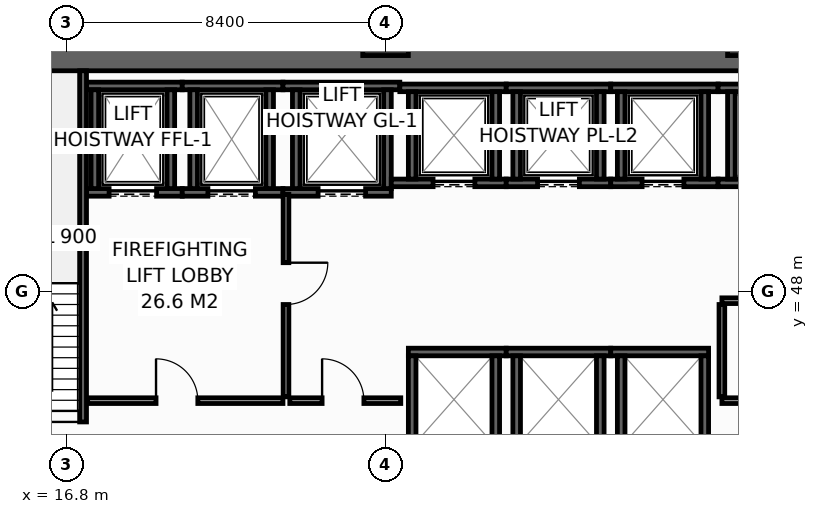
"""IFC4 building model, lengths in metres.
Left out: names, types, materials, properties, quantities, classifications, styles, units other than length and angle.
Written with IfcOpenShell. Run it as: python <this file> out.ifc"""

import sys

from ifc_helpers import new_model, si_unit, direction, frame, frame_2d, origin, origin_2d, place, context, subcontext, project, spatial, rectangle, hollow_rectangle, extrude, element, fill, save


model = new_model("IFC4")
c1 = context("Model", 3, precision=1e-05, world=origin(), true_north=direction((0.0, 1.0)))
c2 = subcontext(c1, "Body", "Model", "MODEL_VIEW")
j1 = project(units=[si_unit("LENGTHUNIT", "METRE"), si_unit("PLANEANGLEUNIT", "RADIAN")], contexts=[c1])
p1 = place(None, origin())
s1 = spatial("IfcSite", under=j1, at=p1, CompositionType="ELEMENT")
p2 = place(p1, origin())
s2 = spatial("IfcBuilding", under=s1, at=p2, CompositionType="ELEMENT")
p3 = place(p2, frame((0.0, 0.0, 47.2)))
s3 = spatial("IfcBuildingStorey", under=s2, at=p3, CompositionType="ELEMENT", Elevation=47.2)
p4 = place(p3, frame((13.5, 54.1, 0.0), z_axis=(0.0, 0.0, 1.0), x_axis=(1.0, 0.0, 0.0)))
e1 = element("IfcWall", 1, at=p4, inside=s3, PredefinedType="SHEAR", context=c2, shape_type="SweptSolid", body=[
    extrude(rectangle(XDim=32.9, YDim=0.6, at=frame_2d((16.45, 0.0))), origin(), (0.0, 0.0, 1.0), 4.15),
])
for number, where, z_axis, x_axis in (
    (2, (25.2, 54.8, 0.0), (0.0, 0.0, 1.0), (1.0, 0.0, 0.0)),
    (3, (34.8, 54.8, 0.0), (0.0, 0.0, 1.0), (1.0, 0.0, 0.0)),
):
    element("IfcColumn", number, at=place(p3, frame(where, z_axis=z_axis, x_axis=x_axis)), inside=s3, PredefinedType="COLUMN", context=c2, shape_type="SweptSolid", body=[
        extrude(hollow_rectangle(XDim=1.2, YDim=1.2, WallThickness=0.055, at=origin_2d()), origin(), (0.0, 0.0, 1.0), 4.4),
    ])
p5 = place(p3, frame((17.33, 50.6, 0.0), z_axis=(0.0, 0.0, 1.0), x_axis=(1.0, 0.0, 0.0)))
e4 = element("IfcWall", 4, at=p5, inside=s3, PredefinedType="SHEAR", context=c2, shape_type="SweptSolid", body=[
    extrude(rectangle(XDim=2.52, YDim=0.2, at=frame_2d((1.26, 0.0))), origin(), (0.0, 0.0, 1.0), 4.15),
])
p6 = place(p5, frame((0.595, 0.0, 0.0)))
e5 = element("IfcOpeningElement", 5, at=p6, cuts=e4, PredefinedType="OPENING", context=c2, shape_type="SweptSolid", body=[
    extrude(rectangle(XDim=1.25, YDim=2.3, at=frame_2d((0.625, 1.15))), frame((0.0, 0.11, 0.0), z_axis=(0.0, -1.0, 0.0), x_axis=(1.0, 0.0, 0.0)), (0.0, 0.0, 1.0), 0.22),
])
p7 = place(p3, frame((17.33, 53.4, 0.0), z_axis=(0.0, 0.0, 1.0), x_axis=(1.0, 0.0, 0.0)))
e6 = element("IfcWall", 6, at=p7, inside=s3, PredefinedType="SHEAR", context=c2, shape_type="SweptSolid", body=[
    extrude(rectangle(XDim=2.52, YDim=0.2, at=frame_2d((1.26, 0.0))), origin(), (0.0, 0.0, 1.0), 4.15),
])
for number, where, z_axis, x_axis in (
    (7, (17.55, 50.7, 0.0), (0.0, 0.0, 1.0), (0.0, 1.0, 0.0)),
    (8, (19.55, 50.7, 0.0), (0.0, 0.0, 1.0), (0.0, 1.0, 0.0)),
):
    element("IfcWall", number, at=place(p3, frame(where, z_axis=z_axis, x_axis=x_axis)), inside=s3, PredefinedType="SHEAR", context=c2, shape_type="SweptSolid", body=[
        extrude(rectangle(XDim=2.6, YDim=0.2, at=frame_2d((1.3, 0.0))), origin(), (0.0, 0.0, 1.0), 4.15),
    ])
p8 = place(p3, frame((19.85, 50.6, 0.0), z_axis=(0.0, 0.0, 1.0), x_axis=(1.0, 0.0, 0.0)))
e9 = element("IfcWall", 9, at=p8, inside=s3, PredefinedType="SHEAR", context=c2, shape_type="SweptSolid", body=[
    extrude(rectangle(XDim=2.65, YDim=0.2, at=frame_2d((1.325, 0.0))), origin(), (0.0, 0.0, 1.0), 4.15),
])
p9 = place(p8, frame((0.675, 0.0, 0.0)))
e10 = element("IfcOpeningElement", 10, at=p9, cuts=e9, PredefinedType="OPENING", context=c2, shape_type="SweptSolid", body=[
    extrude(rectangle(XDim=1.25, YDim=2.3, at=frame_2d((0.625, 1.15))), frame((0.0, 0.11, 0.0), z_axis=(0.0, -1.0, 0.0), x_axis=(1.0, 0.0, 0.0)), (0.0, 0.0, 1.0), 0.22),
])
p10 = place(p3, frame((19.85, 53.4, 0.0), z_axis=(0.0, 0.0, 1.0), x_axis=(1.0, 0.0, 0.0)))
e11 = element("IfcWall", 11, at=p10, inside=s3, PredefinedType="SHEAR", context=c2, shape_type="SweptSolid", body=[
    extrude(rectangle(XDim=2.65, YDim=0.2, at=frame_2d((1.325, 0.0))), origin(), (0.0, 0.0, 1.0), 4.15),
])
for number, where, z_axis, x_axis in (
    (12, (20.15, 50.7, 0.0), (0.0, 0.0, 1.0), (0.0, 1.0, 0.0)),
    (13, (22.15, 50.7, 0.0), (0.0, 0.0, 1.0), (0.0, 1.0, 0.0)),
):
    element("IfcWall", number, at=place(p3, frame(where, z_axis=z_axis, x_axis=x_axis)), inside=s3, PredefinedType="SHEAR", context=c2, shape_type="SweptSolid", body=[
        extrude(rectangle(XDim=2.6, YDim=0.2, at=frame_2d((1.3, 0.0))), origin(), (0.0, 0.0, 1.0), 4.15),
    ])
p11 = place(p3, frame((22.5, 50.6, 0.0), z_axis=(0.0, 0.0, 1.0), x_axis=(1.0, 0.0, 0.0)))
e14 = element("IfcWall", 14, at=p11, inside=s3, PredefinedType="SHEAR", context=c2, shape_type="SweptSolid", body=[
    extrude(rectangle(XDim=2.85, YDim=0.2, at=frame_2d((1.425, 0.0))), origin(), (0.0, 0.0, 1.0), 4.15),
])
p12 = place(p11, frame((0.925, 0.0, 0.0)))
e15 = element("IfcOpeningElement", 15, at=p12, cuts=e14, PredefinedType="OPENING", context=c2, shape_type="SweptSolid", body=[
    extrude(rectangle(XDim=1.25, YDim=2.3, at=frame_2d((0.625, 1.15))), frame((0.0, 0.11, 0.0), z_axis=(0.0, -1.0, 0.0), x_axis=(1.0, 0.0, 0.0)), (0.0, 0.0, 1.0), 0.22),
])
p13 = place(p3, frame((22.5, 53.4, 0.0), z_axis=(0.0, 0.0, 1.0), x_axis=(1.0, 0.0, 0.0)))
e16 = element("IfcWall", 16, at=p13, inside=s3, PredefinedType="SHEAR", context=c2, shape_type="SweptSolid", body=[
    extrude(rectangle(XDim=3.075, YDim=0.2, at=frame_2d((1.538, 0.0))), origin(), (0.0, 0.0, 1.0), 4.15),
])
for number, where, z_axis, x_axis in (
    (17, (22.85, 50.7, 0.0), (0.0, 0.0, 1.0), (0.0, 1.0, 0.0)),
    (18, (25.25, 50.7, 0.0), (0.0, 0.0, 1.0), (0.0, 1.0, 0.0)),
):
    element("IfcWall", number, at=place(p3, frame(where, z_axis=z_axis, x_axis=x_axis)), inside=s3, PredefinedType="SHEAR", context=c2, shape_type="SweptSolid", body=[
        extrude(rectangle(XDim=2.6, YDim=0.2, at=frame_2d((1.3, 0.0))), origin(), (0.0, 0.0, 1.0), 4.15),
    ])
p14 = place(p3, frame((25.35, 50.85, 0.0), z_axis=(0.0, 0.0, 1.0), x_axis=(1.0, 0.0, 0.0)))
e19 = element("IfcWall", 19, at=p14, inside=s3, PredefinedType="SHEAR", context=c2, shape_type="SweptSolid", body=[
    extrude(rectangle(XDim=3.025, YDim=0.2, at=frame_2d((1.512, 0.0))), origin(), (0.0, 0.0, 1.0), 4.15),
])
p15 = place(p14, frame((1.1, 0.0, 0.0)))
e20 = element("IfcOpeningElement", 20, at=p15, cuts=e19, PredefinedType="OPENING", context=c2, shape_type="SweptSolid", body=[
    extrude(rectangle(XDim=1.1, YDim=2.2, at=frame_2d((0.55, 1.1))), frame((0.0, 0.11, 0.0), z_axis=(0.0, -1.0, 0.0), x_axis=(1.0, 0.0, 0.0)), (0.0, 0.0, 1.0), 0.22),
])
p16 = place(p3, frame((25.575, 53.35, 0.0), z_axis=(0.0, 0.0, 1.0), x_axis=(1.0, 0.0, 0.0)))
e21 = element("IfcWall", 21, at=p16, inside=s3, PredefinedType="SHEAR", context=c2, shape_type="SweptSolid", body=[
    extrude(rectangle(XDim=2.8, YDim=0.2, at=frame_2d((1.4, 0.0))), origin(), (0.0, 0.0, 1.0), 4.15),
])
for number, where, z_axis, x_axis in (
    (22, (25.9, 50.95, 0.0), (0.0, 0.0, 1.0), (0.0, 1.0, 0.0)),
    (23, (28.1, 50.95, 0.0), (0.0, 0.0, 1.0), (0.0, 1.0, 0.0)),
):
    element("IfcWall", number, at=place(p3, frame(where, z_axis=z_axis, x_axis=x_axis)), inside=s3, PredefinedType="SHEAR", context=c2, shape_type="SweptSolid", body=[
        extrude(rectangle(XDim=2.3, YDim=0.2, at=frame_2d((1.15, 0.0))), origin(), (0.0, 0.0, 1.0), 4.15),
    ])
p17 = place(p3, frame((28.375, 50.85, 0.0), z_axis=(0.0, 0.0, 1.0), x_axis=(1.0, 0.0, 0.0)))
e24 = element("IfcWall", 24, at=p17, inside=s3, PredefinedType="SHEAR", context=c2, shape_type="SweptSolid", body=[
    extrude(rectangle(XDim=2.75, YDim=0.2, at=frame_2d((1.375, 0.0))), origin(), (0.0, 0.0, 1.0), 4.15),
])
p18 = place(p17, frame((0.825, 0.0, 0.0)))
e25 = element("IfcOpeningElement", 25, at=p18, cuts=e24, PredefinedType="OPENING", context=c2, shape_type="SweptSolid", body=[
    extrude(rectangle(XDim=1.1, YDim=2.2, at=frame_2d((0.55, 1.1))), frame((0.0, 0.11, 0.0), z_axis=(0.0, -1.0, 0.0), x_axis=(1.0, 0.0, 0.0)), (0.0, 0.0, 1.0), 0.22),
])
p19 = place(p3, frame((28.375, 53.35, 0.0), z_axis=(0.0, 0.0, 1.0), x_axis=(1.0, 0.0, 0.0)))
e26 = element("IfcWall", 26, at=p19, inside=s3, PredefinedType="SHEAR", context=c2, shape_type="SweptSolid", body=[
    extrude(rectangle(XDim=2.75, YDim=0.2, at=frame_2d((1.375, 0.0))), origin(), (0.0, 0.0, 1.0), 4.15),
])
for number, where, z_axis, x_axis in (
    (27, (28.65, 50.95, 0.0), (0.0, 0.0, 1.0), (0.0, 1.0, 0.0)),
    (28, (30.85, 50.95, 0.0), (0.0, 0.0, 1.0), (0.0, 1.0, 0.0)),
):
    element("IfcWall", number, at=place(p3, frame(where, z_axis=z_axis, x_axis=x_axis)), inside=s3, PredefinedType="SHEAR", context=c2, shape_type="SweptSolid", body=[
        extrude(rectangle(XDim=2.3, YDim=0.2, at=frame_2d((1.15, 0.0))), origin(), (0.0, 0.0, 1.0), 4.15),
    ])
p20 = place(p3, frame((31.125, 50.85, 0.0), z_axis=(0.0, 0.0, 1.0), x_axis=(1.0, 0.0, 0.0)))
e29 = element("IfcWall", 29, at=p20, inside=s3, PredefinedType="SHEAR", context=c2, shape_type="SweptSolid", body=[
    extrude(rectangle(XDim=2.825, YDim=0.2, at=frame_2d((1.413, 0.0))), origin(), (0.0, 0.0, 1.0), 4.15),
])
p21 = place(p20, frame((0.825, 0.0, 0.0)))
e30 = element("IfcOpeningElement", 30, at=p21, cuts=e29, PredefinedType="OPENING", context=c2, shape_type="SweptSolid", body=[
    extrude(rectangle(XDim=1.1, YDim=2.2, at=frame_2d((0.55, 1.1))), frame((0.0, 0.11, 0.0), z_axis=(0.0, -1.0, 0.0), x_axis=(1.0, 0.0, 0.0)), (0.0, 0.0, 1.0), 0.22),
])
p22 = place(p3, frame((31.125, 53.35, 0.0), z_axis=(0.0, 0.0, 1.0), x_axis=(1.0, 0.0, 0.0)))
e31 = element("IfcWall", 31, at=p22, inside=s3, PredefinedType="SHEAR", context=c2, shape_type="SweptSolid", body=[
    extrude(rectangle(XDim=2.825, YDim=0.2, at=frame_2d((1.413, 0.0))), origin(), (0.0, 0.0, 1.0), 4.15),
])
for number, where, z_axis, x_axis in (
    (32, (31.4, 50.95, 0.0), (0.0, 0.0, 1.0), (0.0, 1.0, 0.0)),
    (33, (33.6, 50.95, 0.0), (0.0, 0.0, 1.0), (0.0, 1.0, 0.0)),
):
    element("IfcWall", number, at=place(p3, frame(where, z_axis=z_axis, x_axis=x_axis)), inside=s3, PredefinedType="SHEAR", context=c2, shape_type="SweptSolid", body=[
        extrude(rectangle(XDim=2.3, YDim=0.2, at=frame_2d((1.15, 0.0))), origin(), (0.0, 0.0, 1.0), 4.15),
    ])
p23 = place(p3, frame((25.8, 46.4, 0.0), z_axis=(0.0, 0.0, 1.0), x_axis=(1.0, 0.0, 0.0)))
e34 = element("IfcWall", 34, at=p23, inside=s3, PredefinedType="SHEAR", context=c2, shape_type="SweptSolid", body=[
    extrude(rectangle(XDim=2.575, YDim=0.2, at=frame_2d((1.288, 0.0))), origin(), (0.0, 0.0, 1.0), 4.15),
])
for number, where, z_axis, x_axis in (
    (35, (25.9, 44.0, 0.0), (0.0, 0.0, 1.0), (0.0, 1.0, 0.0)),
    (36, (28.1, 44.0, 0.0), (0.0, 0.0, 1.0), (0.0, 1.0, 0.0)),
):
    element("IfcWall", number, at=place(p3, frame(where, z_axis=z_axis, x_axis=x_axis)), inside=s3, PredefinedType="SHEAR", context=c2, shape_type="SweptSolid", body=[
        extrude(rectangle(XDim=2.3, YDim=0.2, at=frame_2d((1.15, 0.0))), origin(), (0.0, 0.0, 1.0), 4.15),
    ])
p24 = place(p3, frame((28.375, 46.4, 0.0), z_axis=(0.0, 0.0, 1.0), x_axis=(1.0, 0.0, 0.0)))
e37 = element("IfcWall", 37, at=p24, inside=s3, PredefinedType="SHEAR", context=c2, shape_type="SweptSolid", body=[
    extrude(rectangle(XDim=2.75, YDim=0.2, at=frame_2d((1.375, 0.0))), origin(), (0.0, 0.0, 1.0), 4.15),
])
for number, where, z_axis, x_axis in (
    (38, (28.65, 44.0, 0.0), (0.0, 0.0, 1.0), (0.0, 1.0, 0.0)),
    (39, (30.85, 44.0, 0.0), (0.0, 0.0, 1.0), (0.0, 1.0, 0.0)),
):
    element("IfcWall", number, at=place(p3, frame(where, z_axis=z_axis, x_axis=x_axis)), inside=s3, PredefinedType="SHEAR", context=c2, shape_type="SweptSolid", body=[
        extrude(rectangle(XDim=2.3, YDim=0.2, at=frame_2d((1.15, 0.0))), origin(), (0.0, 0.0, 1.0), 4.15),
    ])
p25 = place(p3, frame((31.125, 46.4, 0.0), z_axis=(0.0, 0.0, 1.0), x_axis=(1.0, 0.0, 0.0)))
e40 = element("IfcWall", 40, at=p25, inside=s3, PredefinedType="SHEAR", context=c2, shape_type="SweptSolid", body=[
    extrude(rectangle(XDim=2.575, YDim=0.2, at=frame_2d((1.288, 0.0))), origin(), (0.0, 0.0, 1.0), 4.15),
])
for number, where, z_axis, x_axis in (
    (41, (31.4, 44.0, 0.0), (0.0, 0.0, 1.0), (0.0, 1.0, 0.0)),
    (42, (33.6, 44.0, 0.0), (0.0, 0.0, 1.0), (0.0, 1.0, 0.0)),
):
    element("IfcWall", number, at=place(p3, frame(where, z_axis=z_axis, x_axis=x_axis)), inside=s3, PredefinedType="SHEAR", context=c2, shape_type="SweptSolid", body=[
        extrude(rectangle(XDim=2.3, YDim=0.2, at=frame_2d((1.15, 0.0))), origin(), (0.0, 0.0, 1.0), 4.15),
    ])
for number, where, z_axis, x_axis in (
    (43, (33.95, 50.85, 0.0), (0.0, 0.0, 1.0), (1.0, 0.0, 0.0)),
    (44, (33.95, 53.35, 0.0), (0.0, 0.0, 1.0), (1.0, 0.0, 0.0)),
):
    element("IfcWall", number, at=place(p3, frame(where, z_axis=z_axis, x_axis=x_axis)), inside=s3, PredefinedType="SHEAR", context=c2, shape_type="SweptSolid", body=[
        extrude(rectangle(XDim=2.825, YDim=0.2, at=frame_2d((1.413, 0.0))), origin(), (0.0, 0.0, 1.0), 4.15),
    ])
p26 = place(p3, frame((34.3, 50.95, 0.0), z_axis=(0.0, 0.0, 1.0), x_axis=(0.0, 1.0, 0.0)))
e45 = element("IfcWall", 45, at=p26, inside=s3, PredefinedType="SHEAR", context=c2, shape_type="SweptSolid", body=[
    extrude(rectangle(XDim=2.3, YDim=0.2, at=frame_2d((1.15, 0.0))), origin(), (0.0, 0.0, 1.0), 4.15),
])
p27 = place(p3, frame((17.24, 43.4, 0.0), z_axis=(0.0, 0.0, 1.0), x_axis=(0.0, 1.0, 0.0)))
e46 = element("IfcWall", 46, at=p27, inside=s3, PredefinedType="SHEAR", context=c2, shape_type="SweptSolid", body=[
    extrude(rectangle(XDim=10.4, YDim=0.18, at=frame_2d((5.2, 0.0))), origin(), (0.0, 0.0, 1.0), 4.15),
])
p28 = place(p27, frame((0.16, 0.0, 0.0)))
e47 = element("IfcOpeningElement", 47, at=p28, cuts=e46, PredefinedType="OPENING", context=c2, shape_type="SweptSolid", body=[
    extrude(rectangle(XDim=1.0, YDim=2.15, at=frame_2d((0.5, 1.075))), frame((0.0, 0.1, 0.0), z_axis=(0.0, -1.0, 0.0), x_axis=(1.0, 0.0, 0.0)), (0.0, 0.0, 1.0), 0.2),
])
p29 = place(p3, frame((17.36, 45.12, 0.0), z_axis=(0.0, 0.0, 1.0), x_axis=(1.0, 0.0, 0.0)))
e48 = element("IfcWall", 48, at=p29, inside=s3, PredefinedType="PARTITIONING", context=c2, shape_type="SweptSolid", body=[
    extrude(rectangle(XDim=5.14, YDim=0.15, at=frame_2d((2.57, 0.0))), origin(), (0.0, 0.0, 1.0), 4.15),
])
p30 = place(p29, frame((1.8, 0.0, 0.0)))
e49 = element("IfcOpeningElement", 49, at=p30, cuts=e48, PredefinedType="OPENING", context=c2, shape_type="SweptSolid", body=[
    extrude(rectangle(XDim=1.1, YDim=2.15, at=frame_2d((0.55, 1.075))), frame((0.0, 0.085, 0.0), z_axis=(0.0, -1.0, 0.0), x_axis=(1.0, 0.0, 0.0)), (0.0, 0.0, 1.0), 0.17),
])
p31 = place(p3, frame((22.58, 50.55, 0.0), z_axis=(0.0, 0.0, 1.0), x_axis=(0.0, -1.0, 0.0)))
e50 = element("IfcWall", 50, at=p31, inside=s3, PredefinedType="PARTITIONING", context=c2, shape_type="SweptSolid", body=[
    extrude(rectangle(XDim=5.33, YDim=0.15, at=frame_2d((2.665, 0.0))), origin(), (0.0, 0.0, 1.0), 4.15),
])
p32 = place(p31, frame((1.8, 0.0, 0.0)))
e51 = element("IfcOpeningElement", 51, at=p32, cuts=e50, PredefinedType="OPENING", context=c2, shape_type="SweptSolid", body=[
    extrude(rectangle(XDim=1.1, YDim=2.15, at=frame_2d((0.55, 1.075))), frame((0.0, 0.085, 0.0), z_axis=(0.0, -1.0, 0.0), x_axis=(1.0, 0.0, 0.0)), (0.0, 0.0, 1.0), 0.17),
])
p33 = place(p3, frame((22.68, 45.12, 0.0), z_axis=(0.0, 0.0, 1.0), x_axis=(1.0, 0.0, 0.0)))
e52 = element("IfcWall", 52, at=p33, inside=s3, PredefinedType="PARTITIONING", context=c2, shape_type="SweptSolid", body=[
    extrude(rectangle(XDim=2.92, YDim=0.15, at=frame_2d((1.46, 0.0))), origin(), (0.0, 0.0, 1.0), 4.15),
])
p34 = place(p33, frame((0.85, 0.0, 0.0)))
e53 = element("IfcOpeningElement", 53, at=p34, cuts=e52, PredefinedType="OPENING", context=c2, shape_type="SweptSolid", body=[
    extrude(rectangle(XDim=1.1, YDim=2.15, at=frame_2d((0.55, 1.075))), frame((0.0, 0.085, 0.0), z_axis=(0.0, -1.0, 0.0), x_axis=(1.0, 0.0, 0.0)), (0.0, 0.0, 1.0), 0.17),
])
p35 = place(p3, frame((34.05, 45.12, 0.0), z_axis=(0.0, 0.0, 1.0), x_axis=(1.0, 0.0, 0.0)))
e54 = element("IfcWall", 54, at=p35, inside=s3, PredefinedType="PARTITIONING", context=c2, shape_type="SweptSolid", body=[
    extrude(rectangle(XDim=8.45, YDim=0.15, at=frame_2d((4.225, 0.0))), origin(), (0.0, 0.0, 1.0), 4.15),
])
p36 = place(p35, frame((3.6, 0.0, 0.0)))
e55 = element("IfcOpeningElement", 55, at=p36, cuts=e54, PredefinedType="OPENING", context=c2, shape_type="SweptSolid", body=[
    extrude(rectangle(XDim=0.95, YDim=2.15, at=frame_2d((0.475, 1.075))), frame((0.0, 0.085, 0.0), z_axis=(0.0, -1.0, 0.0), x_axis=(1.0, 0.0, 0.0)), (0.0, 0.0, 1.0), 0.17),
])
p37 = place(p3, frame((34.05, 47.75, 0.0), z_axis=(0.0, 0.0, 1.0), x_axis=(1.0, 0.0, 0.0)))
e56 = element("IfcWall", 56, at=p37, inside=s3, PredefinedType="PARTITIONING", context=c2, shape_type="SweptSolid", body=[
    extrude(rectangle(XDim=8.45, YDim=0.15, at=frame_2d((4.225, 0.0))), origin(), (0.0, 0.0, 1.0), 4.15),
])
p38 = place(p3, frame((34.05, 45.22, 0.0), z_axis=(0.0, 0.0, 1.0), x_axis=(0.0, 1.0, 0.0)))
e57 = element("IfcWall", 57, at=p38, inside=s3, PredefinedType="PARTITIONING", context=c2, shape_type="SweptSolid", body=[
    extrude(rectangle(XDim=2.43, YDim=0.15, at=frame_2d((1.215, 0.0))), origin(), (0.0, 0.0, 1.0), 4.15),
])
p39 = place(p6, origin())
e58 = element("IfcDoor", 58, at=p39, inside=s3, OperationType="SLIDING_TO_LEFT", PredefinedType="DOOR", context=c2, shape_type="SweptSolid", body=[
    extrude(rectangle(XDim=1.25, YDim=2.3, at=frame_2d((0.625, 1.15))), frame((0.0, 0.025, 0.0), z_axis=(0.0, -1.0, 0.0), x_axis=(1.0, 0.0, 0.0)), (0.0, 0.0, 1.0), 0.05),
])
fill(e5, e58)
p40 = place(p9, origin())
e59 = element("IfcDoor", 59, at=p40, inside=s3, OperationType="SLIDING_TO_LEFT", PredefinedType="DOOR", context=c2, shape_type="SweptSolid", body=[
    extrude(rectangle(XDim=1.25, YDim=2.3, at=frame_2d((0.625, 1.15))), frame((0.0, 0.025, 0.0), z_axis=(0.0, -1.0, 0.0), x_axis=(1.0, 0.0, 0.0)), (0.0, 0.0, 1.0), 0.05),
])
fill(e10, e59)
p41 = place(p12, origin())
e60 = element("IfcDoor", 60, at=p41, inside=s3, OperationType="SLIDING_TO_LEFT", PredefinedType="DOOR", context=c2, shape_type="SweptSolid", body=[
    extrude(rectangle(XDim=1.25, YDim=2.3, at=frame_2d((0.625, 1.15))), frame((0.0, 0.025, 0.0), z_axis=(0.0, -1.0, 0.0), x_axis=(1.0, 0.0, 0.0)), (0.0, 0.0, 1.0), 0.05),
])
fill(e15, e60)
p42 = place(p15, origin())
e61 = element("IfcDoor", 61, at=p42, inside=s3, OperationType="SLIDING_TO_LEFT", PredefinedType="DOOR", context=c2, shape_type="SweptSolid", body=[
    extrude(rectangle(XDim=1.1, YDim=2.2, at=frame_2d((0.55, 1.1))), frame((0.0, 0.025, 0.0), z_axis=(0.0, -1.0, 0.0), x_axis=(1.0, 0.0, 0.0)), (0.0, 0.0, 1.0), 0.05),
])
fill(e20, e61)
p43 = place(p18, origin())
e62 = element("IfcDoor", 62, at=p43, inside=s3, OperationType="SLIDING_TO_LEFT", PredefinedType="DOOR", context=c2, shape_type="SweptSolid", body=[
    extrude(rectangle(XDim=1.1, YDim=2.2, at=frame_2d((0.55, 1.1))), frame((0.0, 0.025, 0.0), z_axis=(0.0, -1.0, 0.0), x_axis=(1.0, 0.0, 0.0)), (0.0, 0.0, 1.0), 0.05),
])
fill(e25, e62)
p44 = place(p21, origin())
e63 = element("IfcDoor", 63, at=p44, inside=s3, OperationType="SLIDING_TO_LEFT", PredefinedType="DOOR", context=c2, shape_type="SweptSolid", body=[
    extrude(rectangle(XDim=1.1, YDim=2.2, at=frame_2d((0.55, 1.1))), frame((0.0, 0.025, 0.0), z_axis=(0.0, -1.0, 0.0), x_axis=(1.0, 0.0, 0.0)), (0.0, 0.0, 1.0), 0.05),
])
fill(e30, e63)
p45 = place(p28, origin())
e64 = element("IfcDoor", 64, at=p45, inside=s3, OperationType="SINGLE_SWING_RIGHT", PredefinedType="DOOR", context=c2, shape_type="SweptSolid", body=[
    extrude(rectangle(XDim=1.0, YDim=2.15, at=frame_2d((0.5, 1.075))), frame((0.0, 0.025, 0.0), z_axis=(0.0, -1.0, 0.0), x_axis=(1.0, 0.0, 0.0)), (0.0, 0.0, 1.0), 0.05),
])
fill(e47, e64)
p46 = place(p30, origin())
e65 = element("IfcDoor", 65, at=p46, inside=s3, OperationType="SINGLE_SWING_LEFT", PredefinedType="DOOR", context=c2, shape_type="SweptSolid", body=[
    extrude(rectangle(XDim=1.1, YDim=2.15, at=frame_2d((0.55, 1.075))), frame((0.0, 0.025, 0.0), z_axis=(0.0, -1.0, 0.0), x_axis=(1.0, 0.0, 0.0)), (0.0, 0.0, 1.0), 0.05),
])
fill(e49, e65)
p47 = place(p32, origin())
e66 = element("IfcDoor", 66, at=p47, inside=s3, OperationType="SINGLE_SWING_LEFT", PredefinedType="DOOR", context=c2, shape_type="SweptSolid", body=[
    extrude(rectangle(XDim=1.1, YDim=2.15, at=frame_2d((0.55, 1.075))), frame((0.0, 0.025, 0.0), z_axis=(0.0, -1.0, 0.0), x_axis=(1.0, 0.0, 0.0)), (0.0, 0.0, 1.0), 0.05),
])
fill(e51, e66)
p48 = place(p34, origin())
e67 = element("IfcDoor", 67, at=p48, inside=s3, OperationType="SINGLE_SWING_LEFT", PredefinedType="DOOR", context=c2, shape_type="SweptSolid", body=[
    extrude(rectangle(XDim=1.1, YDim=2.15, at=frame_2d((0.55, 1.075))), frame((0.0, 0.025, 0.0), z_axis=(0.0, -1.0, 0.0), x_axis=(1.0, 0.0, 0.0)), (0.0, 0.0, 1.0), 0.05),
])
fill(e53, e67)
save(model, sys.argv[1])
